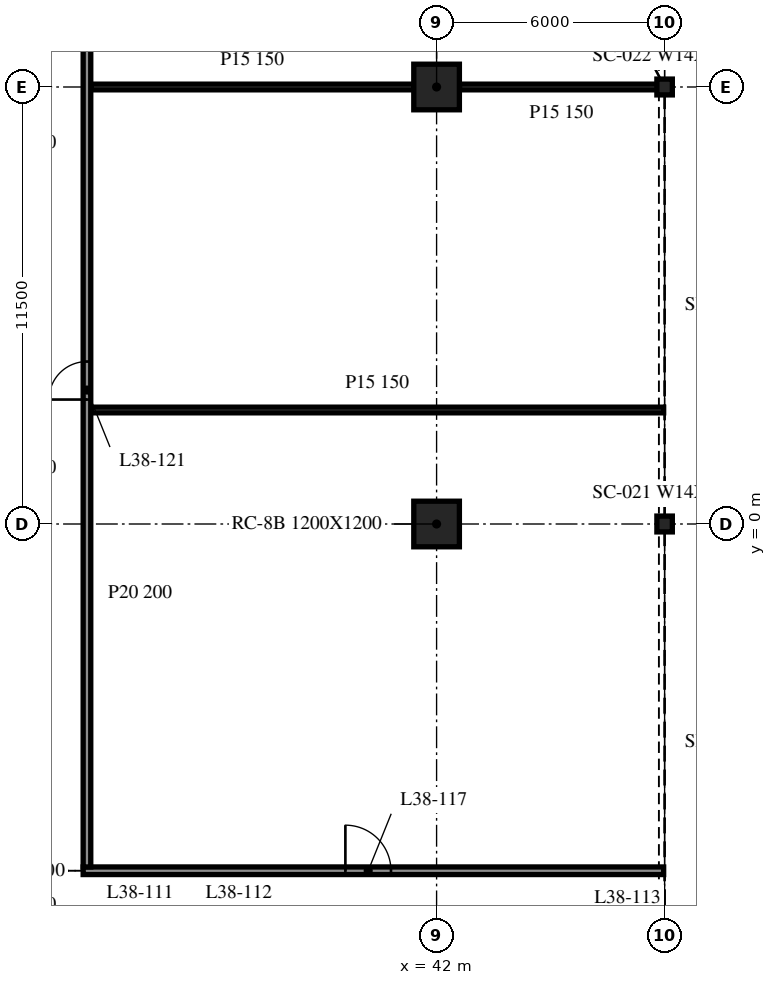
"""IFC4 building model, lengths in metres.
Left out: names, types, materials, properties, quantities, classifications, styles, units other than length and angle.
Written with IfcOpenShell. Run it as: python <this file> out.ifc"""

import sys

from ifc_helpers import new_model, si_unit, direction, frame, frame_2d, origin, origin_2d, place, context, subcontext, project, spatial, rectangle, i_section, extrude, element, fill, save


model = new_model("IFC4")
c1 = context("Model", 3, precision=1e-05, world=origin(), true_north=direction((0.0, 1.0)))
c2 = subcontext(c1, "Body", "Model", "MODEL_VIEW")
j1 = project(units=[si_unit("LENGTHUNIT", "METRE"), si_unit("PLANEANGLEUNIT", "RADIAN")], contexts=[c1])
p1 = place(None, origin())
s1 = spatial("IfcSite", under=j1, at=p1, CompositionType="ELEMENT")
p2 = place(p1, origin())
s2 = spatial("IfcBuilding", under=s1, at=p2, CompositionType="ELEMENT")
p3 = place(p2, frame((0.0, 0.0, 163.0)))
s3 = spatial("IfcBuildingStorey", under=s2, at=p3, CompositionType="ELEMENT", Elevation=163.0)
for number, where, z_axis, x_axis in (
    (1, (42.0, 0.0, -0.34), (0.0, 0.0, 1.0), (1.0, 0.0, 0.0)),
    (2, (42.0, 11.5, -0.34), (0.0, 0.0, 1.0), (1.0, 0.0, 0.0)),
):
    element("IfcColumn", number, at=place(p3, frame(where, z_axis=z_axis, x_axis=x_axis)), inside=s3, PredefinedType="COLUMN", context=c2, shape_type="SweptSolid", body=[
        extrude(rectangle(XDim=1.2, YDim=1.2, at=origin_2d()), origin(), (0.0, 0.0, 1.0), 3.8),
    ])
for number, where, z_axis, x_axis in (
    (3, (48.0, 0.0, -0.34), (0.0, 0.0, 1.0), (1.0, 0.0, 0.0)),
    (4, (48.0, 11.5, -0.34), (0.0, 0.0, 1.0), (1.0, 0.0, 0.0)),
):
    element("IfcColumn", number, at=place(p3, frame(where, z_axis=z_axis, x_axis=x_axis)), inside=s3, PredefinedType="COLUMN", context=c2, shape_type="SweptSolid", body=[
        extrude(i_section(OverallWidth=0.406, OverallDepth=0.417, WebThickness=0.03, FlangeThickness=0.048, at=origin_2d()), origin(), (0.0, 0.0, 1.0), 3.8),
    ])
p4 = place(p3, frame((32.7, -9.125, 0.0), z_axis=(0.0, 0.0, 1.0), x_axis=(1.0, 0.0, 0.0)))
e5 = element("IfcWall", 5, at=p4, inside=s3, PredefinedType="PARTITIONING", context=c2, shape_type="SweptSolid", body=[
    extrude(rectangle(XDim=15.275, YDim=0.2, at=frame_2d((7.638, 0.0))), origin(), (0.0, 0.0, 1.0), 3.46),
])
p5 = place(p4, frame((6.9, 0.0, 0.0)))
e6 = element("IfcOpeningElement", 6, at=p5, cuts=e5, PredefinedType="OPENING", context=c2, shape_type="SweptSolid", body=[
    extrude(rectangle(XDim=1.2, YDim=2.1, at=frame_2d((0.6, 1.05))), frame((0.0, 0.11, 0.0), z_axis=(0.0, -1.0, 0.0), x_axis=(1.0, 0.0, 0.0)), (0.0, 0.0, 1.0), 0.22),
])
p6 = place(p3, frame((32.9, 3.0, 0.0), z_axis=(0.0, 0.0, 1.0), x_axis=(1.0, 0.0, 0.0)))
e7 = element("IfcWall", 7, at=p6, inside=s3, PredefinedType="PARTITIONING", context=c2, shape_type="SweptSolid", body=[
    extrude(rectangle(XDim=15.075, YDim=0.15, at=frame_2d((7.538, 0.0))), origin(), (0.0, 0.0, 1.0), 3.46),
])
p7 = place(p3, frame((32.9, 11.5, 0.0), z_axis=(0.0, 0.0, 1.0), x_axis=(1.0, 0.0, 0.0)))
e8 = element("IfcWall", 8, at=p7, inside=s3, PredefinedType="PARTITIONING", context=c2, shape_type="SweptSolid", body=[
    extrude(rectangle(XDim=8.5, YDim=0.15, at=frame_2d((4.25, 0.0))), origin(), (0.0, 0.0, 1.0), 3.46),
])
p8 = place(p3, frame((42.6, 11.5, 0.0), z_axis=(0.0, 0.0, 1.0), x_axis=(1.0, 0.0, 0.0)))
e9 = element("IfcWall", 9, at=p8, inside=s3, PredefinedType="PARTITIONING", context=c2, shape_type="SweptSolid", body=[
    extrude(rectangle(XDim=5.375, YDim=0.15, at=frame_2d((2.688, 0.0))), origin(), (0.0, 0.0, 1.0), 3.46),
])
p9 = place(p3, frame((32.8, -9.025, 0.0), z_axis=(0.0, 0.0, 1.0), x_axis=(0.0, 1.0, 0.0)))
e10 = element("IfcWall", 10, at=p9, inside=s3, PredefinedType="PARTITIONING", context=c2, shape_type="SweptSolid", body=[
    extrude(rectangle(XDim=24.05, YDim=0.2, at=frame_2d((12.025, 0.0))), origin(), (0.0, 0.0, 1.0), 3.46),
])
p10 = place(p9, frame((12.3, 0.0, 0.0)))
e11 = element("IfcOpeningElement", 11, at=p10, cuts=e10, PredefinedType="OPENING", context=c2, shape_type="SweptSolid", body=[
    extrude(rectangle(XDim=1.0, YDim=2.1, at=frame_2d((0.5, 1.05))), frame((0.0, 0.11, 0.0), z_axis=(0.0, -1.0, 0.0), x_axis=(1.0, 0.0, 0.0)), (0.0, 0.0, 1.0), 0.22),
])
p11 = place(p5, origin())
e12 = element("IfcDoor", 12, at=p11, inside=s3, OperationType="SINGLE_SWING_LEFT", PredefinedType="DOOR", context=c2, shape_type="SweptSolid", body=[
    extrude(rectangle(XDim=1.2, YDim=2.1, at=frame_2d((0.6, 1.05))), frame((0.0, 0.025, 0.0), z_axis=(0.0, -1.0, 0.0), x_axis=(1.0, 0.0, 0.0)), (0.0, 0.0, 1.0), 0.05),
])
fill(e6, e12)
p12 = place(p10, origin())
e13 = element("IfcDoor", 13, at=p12, inside=s3, OperationType="SINGLE_SWING_LEFT", PredefinedType="DOOR", context=c2, shape_type="SweptSolid", body=[
    extrude(rectangle(XDim=1.0, YDim=2.1, at=frame_2d((0.5, 1.05))), frame((0.0, 0.025, 0.0), z_axis=(0.0, -1.0, 0.0), x_axis=(1.0, 0.0, 0.0)), (0.0, 0.0, 1.0), 0.05),
])
fill(e11, e13)
save(model, sys.argv[1])
